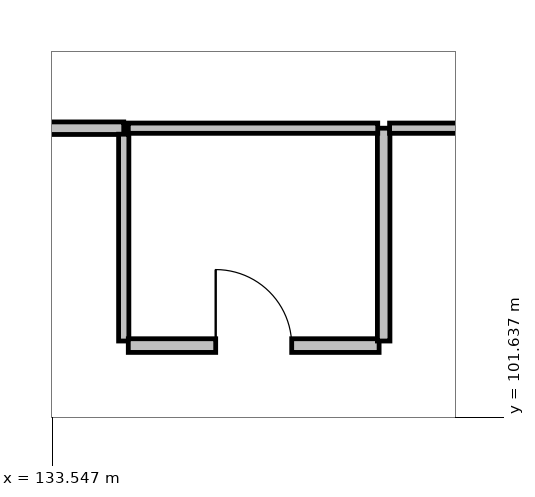
"""IFC4 building model, lengths in metres.
Left out: names, types, materials, properties, quantities, classifications, styles, units other than length and angle.
Written with IfcOpenShell. Run it as: python <this file> out.ifc"""

import sys

from ifc_helpers import new_model, si_unit, direction, frame, frame_2d, origin, place, context, subcontext, project, spatial, rectangle, extrude, element, fill, save


model = new_model("IFC4")
c1 = context("Model", 3, precision=1e-05, world=origin(), true_north=direction((0.0, 1.0)))
c2 = subcontext(c1, "Body", "Model", "MODEL_VIEW")
j1 = project(units=[si_unit("LENGTHUNIT", "METRE"), si_unit("PLANEANGLEUNIT", "RADIAN")], contexts=[c1])
p1 = place(None, origin())
s1 = spatial("IfcSite", under=j1, at=p1, CompositionType="ELEMENT")
p2 = place(p1, origin())
s2 = spatial("IfcBuilding", under=s1, at=p2, CompositionType="ELEMENT")
p3 = place(p2, frame((0.0, 0.0, 19.2)))
s3 = spatial("IfcBuildingStorey", under=s2, at=p3, CompositionType="ELEMENT", Elevation=19.2)
p4 = place(p3, frame((132.056, 105.44, 0.0), z_axis=(0.0, 0.0, 1.0), x_axis=(1.0, 0.0, 0.0)))
e1 = element("IfcWall", 1, at=p4, inside=s3, PredefinedType="PARTITIONING", context=c2, shape_type="SweptSolid", body=[
    extrude(rectangle(XDim=2.434, YDim=0.165, at=frame_2d((1.217, 0.0))), origin(), (0.0, 0.0, 1.0), 3.77),
])
p5 = place(p3, frame((134.49, 105.361, 0.0), z_axis=(0.0, 0.0, 1.0), x_axis=(0.0, -1.0, 0.0)))
e2 = element("IfcWall", 2, at=p5, inside=s3, PredefinedType="PARTITIONING", context=c2, shape_type="SweptSolid", body=[
    extrude(rectangle(XDim=2.721, YDim=0.135, at=frame_2d((1.361, 0.0))), origin(), (0.0, 0.0, 1.0), 3.77),
])
p6 = place(p3, frame((134.55, 102.58, 0.0), z_axis=(0.0, 0.0, 1.0), x_axis=(1.0, 0.0, 0.0)))
e3 = element("IfcWall", 3, at=p6, inside=s3, PredefinedType="PARTITIONING", context=c2, shape_type="SweptSolid", body=[
    extrude(rectangle(XDim=3.3, YDim=0.18, at=frame_2d((1.65, 0.0))), origin(), (0.0, 0.0, 1.0), 3.77),
])
p7 = place(p6, frame((1.15, 0.0, 0.0)))
e4 = element("IfcOpeningElement", 4, at=p7, cuts=e3, PredefinedType="OPENING", context=c2, shape_type="SweptSolid", body=[
    extrude(rectangle(XDim=1.0, YDim=2.15, at=frame_2d((0.5, 1.075))), frame((0.0, 0.1, 0.0), z_axis=(0.0, -1.0, 0.0), x_axis=(1.0, 0.0, 0.0)), (0.0, 0.0, 1.0), 0.2),
])
p8 = place(p3, frame((137.91, 102.64, 0.0), z_axis=(0.0, 0.0, 1.0), x_axis=(0.0, 1.0, 0.0)))
e5 = element("IfcWall", 5, at=p8, inside=s3, PredefinedType="PARTITIONING", context=c2, shape_type="SweptSolid", body=[
    extrude(rectangle(XDim=2.8, YDim=0.165, at=frame_2d((1.4, 0.0))), origin(), (0.0, 0.0, 1.0), 3.77),
])
p9 = place(p3, frame((137.988, 105.44, 0.0), z_axis=(0.0, 0.0, 1.0), x_axis=(1.0, 0.0, 0.0)))
e6 = element("IfcWall", 6, at=p9, inside=s3, PredefinedType="PARTITIONING", context=c2, shape_type="SweptSolid", body=[
    extrude(rectangle(XDim=2.412, YDim=0.135, at=frame_2d((1.206, 0.0))), origin(), (0.0, 0.0, 1.0), 3.77),
])
p10 = place(p3, frame((134.55, 105.44, 0.0), z_axis=(0.0, 0.0, 1.0), x_axis=(1.0, 0.0, 0.0)))
e7 = element("IfcWall", 7, at=p10, inside=s3, PredefinedType="PARTITIONING", context=c2, shape_type="SweptSolid", body=[
    extrude(rectangle(XDim=3.282, YDim=0.135, at=frame_2d((1.641, 0.0))), origin(), (0.0, 0.0, 1.0), 3.77),
])
p11 = place(p7, origin())
e8 = element("IfcDoor", 8, at=p11, inside=s3, OperationType="SINGLE_SWING_LEFT", PredefinedType="DOOR", context=c2, shape_type="SweptSolid", body=[
    extrude(rectangle(XDim=1.0, YDim=2.15, at=frame_2d((0.5, 1.075))), frame((0.0, 0.025, 0.0), z_axis=(0.0, -1.0, 0.0), x_axis=(1.0, 0.0, 0.0)), (0.0, 0.0, 1.0), 0.05),
])
fill(e4, e8)
save(model, sys.argv[1])
